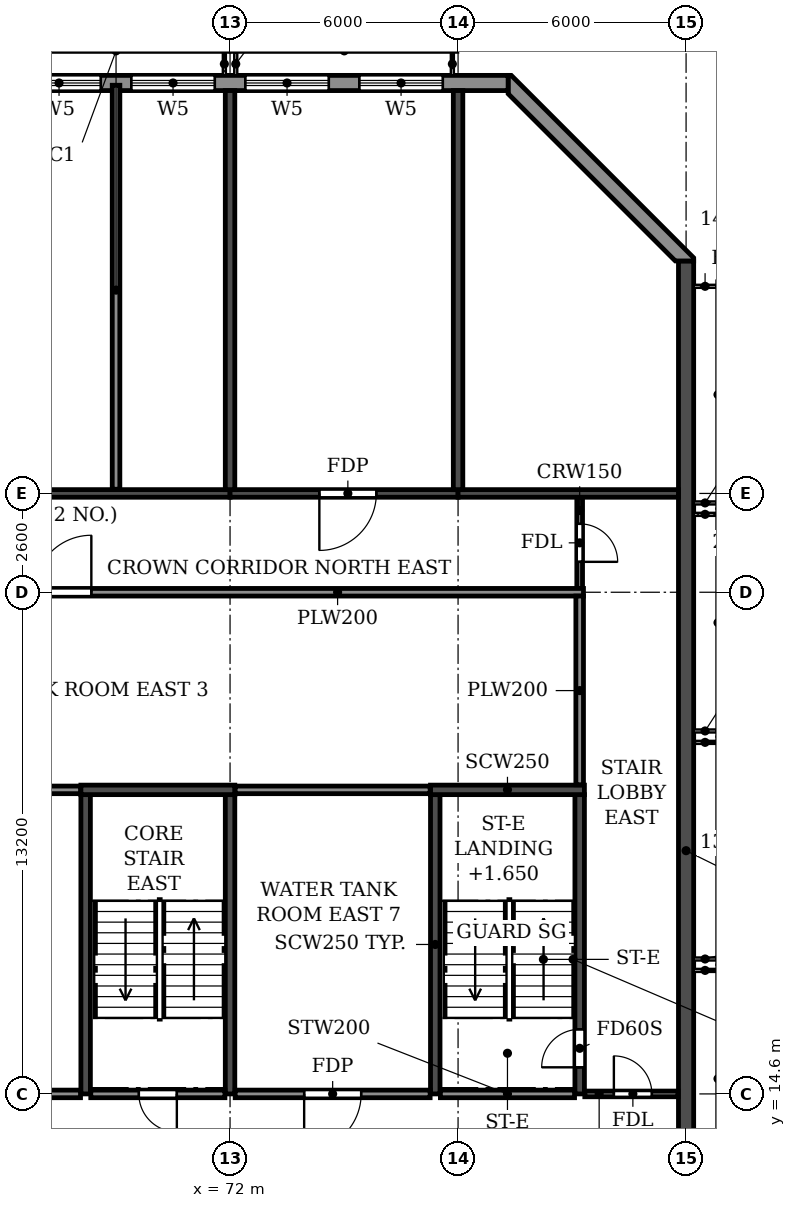
"""IFC4 building model, lengths in metres.
Left out: names, types, materials, properties, quantities, classifications, styles, units other than length and angle.
Written with IfcOpenShell. Run it as: python <this file> out.ifc"""

import sys

from ifc_helpers import new_model, si_unit, direction, frame, frame_2d, origin, place, context, subcontext, project, spatial, polyline, rectangle, outline, extrude, element, fill, save


model = new_model("IFC4")
c1 = context("Model", 3, precision=1e-05, world=origin(), true_north=direction((0.0, 1.0)))
c2 = subcontext(c1, "Body", "Model", "MODEL_VIEW")
j1 = project(units=[si_unit("LENGTHUNIT", "METRE"), si_unit("PLANEANGLEUNIT", "RADIAN")], contexts=[c1])
p1 = place(None, origin())
s1 = spatial("IfcSite", under=j1, at=p1, CompositionType="ELEMENT")
p2 = place(p1, origin())
s2 = spatial("IfcBuilding", under=s1, at=p2, CompositionType="ELEMENT")
p3 = place(p2, frame((0.0, 0.0, 272.4)))
s3 = spatial("IfcBuildingStorey", under=s2, at=p3, CompositionType="ELEMENT", Elevation=272.4)
for number, where, z_axis, x_axis in (
    (1, (72.0, 30.5, 0.0), (0.0, 0.0, 1.0), (0.0, 1.0, 0.0)),
    (2, (78.0, 30.5, 0.0), (0.0, 0.0, 1.0), (0.0, 1.0, 0.0)),
):
    element("IfcWall", number, at=place(p3, frame(where, z_axis=z_axis, x_axis=x_axis)), inside=s3, PredefinedType="SHEAR", context=c2, shape_type="SweptSolid", body=[
        extrude(rectangle(XDim=10.5, YDim=0.25, at=frame_2d((5.25, 0.0))), origin(), (0.0, 0.0, 1.0), 3.05),
    ])
p4 = place(p3, frame((84.0, 4.683, 0.0), z_axis=(0.0, 0.0, 1.0), x_axis=(0.0, 1.0, 0.0)))
e3 = element("IfcWall", 3, at=p4, inside=s3, PredefinedType="SHEAR", context=c2, shape_type="SweptSolid", body=[
    extrude(rectangle(XDim=31.834, YDim=0.4, at=frame_2d((15.917, 0.0))), origin(), (0.0, 0.0, 1.0), 3.05),
])
p5 = place(p3, frame((66.0, 30.4, 0.0), z_axis=(0.0, 0.0, 1.0), x_axis=(1.0, 0.0, 0.0)))
e4 = element("IfcWall", 4, at=p5, inside=s3, PredefinedType="SHEAR", context=c2, shape_type="SweptSolid", body=[
    extrude(rectangle(XDim=6.0, YDim=0.2, at=frame_2d((3.0, 0.0))), origin(), (0.0, 0.0, 1.0), 2.45),
])
p6 = place(p3, frame((72.0, 30.4, 0.0), z_axis=(0.0, 0.0, 1.0), x_axis=(1.0, 0.0, 0.0)))
e5 = element("IfcWall", 5, at=p6, inside=s3, PredefinedType="SHEAR", context=c2, shape_type="SweptSolid", body=[
    extrude(rectangle(XDim=6.0, YDim=0.2, at=frame_2d((3.0, 0.0))), origin(), (0.0, 0.0, 1.0), 2.45),
])
p7 = place(p6, frame((2.35, 0.0, 0.0)))
e6 = element("IfcOpeningElement", 6, at=p7, cuts=e5, PredefinedType="OPENING", context=c2, shape_type="SweptSolid", body=[
    extrude(rectangle(XDim=1.5, YDim=2.1, at=frame_2d((0.75, 1.05))), frame((0.0, 0.11, 0.0), z_axis=(0.0, -1.0, 0.0), x_axis=(1.0, 0.0, 0.0)), (0.0, 0.0, 1.0), 0.22),
])
p8 = place(p3, frame((78.0, 30.4, 0.0), z_axis=(0.0, 0.0, 1.0), x_axis=(1.0, 0.0, 0.0)))
e7 = element("IfcWall", 7, at=p8, inside=s3, PredefinedType="SHEAR", context=c2, shape_type="SweptSolid", body=[
    extrude(rectangle(XDim=5.8, YDim=0.2, at=frame_2d((2.9, 0.0))), origin(), (0.0, 0.0, 1.0), 2.45),
])
p9 = place(p3, frame((77.4, 14.6, 0.0), z_axis=(0.0, 0.0, 1.0), x_axis=(0.0, 1.0, 0.0)))
e8 = element("IfcWall", 8, at=p9, inside=s3, PredefinedType="SOLIDWALL", context=c2, shape_type="SweptSolid", body=[
    extrude(rectangle(XDim=7.875, YDim=0.25, at=frame_2d((3.938, 0.0))), origin(), (0.0, 0.0, 1.0), 3.05),
])
p10 = place(p3, frame((81.2, 14.6, 0.0), z_axis=(0.0, 0.0, 1.0), x_axis=(0.0, 1.0, 0.0)))
e9 = element("IfcWall", 9, at=p10, inside=s3, PredefinedType="SOLIDWALL", context=c2, shape_type="SweptSolid", body=[
    extrude(rectangle(XDim=7.875, YDim=0.25, at=frame_2d((3.938, 0.0))), origin(), (0.0, 0.0, 1.0), 3.05),
])
p11 = place(p10, frame((0.7, 0.0, 0.0)))
e10 = element("IfcOpeningElement", 10, at=p11, cuts=e9, PredefinedType="OPENING", context=c2, shape_type="SweptSolid", body=[
    extrude(rectangle(XDim=1.0, YDim=2.1, at=frame_2d((0.5, 1.05))), frame((0.0, 0.135, 0.0), z_axis=(0.0, -1.0, 0.0), x_axis=(1.0, 0.0, 0.0)), (0.0, 0.0, 1.0), 0.27),
])
p12 = place(p3, frame((77.275, 22.6, 0.0), z_axis=(0.0, 0.0, 1.0), x_axis=(1.0, 0.0, 0.0)))
e11 = element("IfcWall", 11, at=p12, inside=s3, PredefinedType="SOLIDWALL", context=c2, shape_type="SweptSolid", body=[
    extrude(rectangle(XDim=4.05, YDim=0.25, at=frame_2d((2.025, 0.0))), origin(), (0.0, 0.0, 1.0), 3.05),
])
for number, where, z_axis, x_axis in (
    (12, (68.2, 14.6, 0.0), (0.0, 0.0, 1.0), (0.0, 1.0, 0.0)),
    (13, (72.0, 14.6, 0.0), (0.0, 0.0, 1.0), (0.0, 1.0, 0.0)),
):
    element("IfcWall", number, at=place(p3, frame(where, z_axis=z_axis, x_axis=x_axis)), inside=s3, PredefinedType="SOLIDWALL", context=c2, shape_type="SweptSolid", body=[
        extrude(rectangle(XDim=7.875, YDim=0.25, at=frame_2d((3.938, 0.0))), origin(), (0.0, 0.0, 1.0), 3.05),
    ])
p13 = place(p3, frame((68.075, 22.6, 0.0), z_axis=(0.0, 0.0, 1.0), x_axis=(1.0, 0.0, 0.0)))
e14 = element("IfcWall", 14, at=p13, inside=s3, PredefinedType="SOLIDWALL", context=c2, shape_type="SweptSolid", body=[
    extrude(rectangle(XDim=4.05, YDim=0.25, at=frame_2d((2.025, 0.0))), origin(), (0.0, 0.0, 1.0), 3.05),
])
p14 = place(p3, origin())
e15 = element("IfcWall", 15, at=p14, inside=s3, PredefinedType="STANDARD", context=c2, shape_type="SweptSolid", body=[
    extrude(outline(polyline([(84.2, 36.517), (84.2, 36.6), (79.4, 41.4), (79.317, 41.4), (79.317, 40.917), (83.717, 36.517), (84.2, 36.517)])), origin(), (0.0, 0.0, 1.0), 3.05),
])
p15 = place(p3, frame((79.317, 41.2, 0.0), z_axis=(0.0, 0.0, 1.0), x_axis=(-1.0, 0.0, 0.0)))
e16 = element("IfcWall", 16, at=p15, inside=s3, PredefinedType="STANDARD", context=c2, shape_type="SweptSolid", body=[
    extrude(rectangle(XDim=25.517, YDim=0.4, at=frame_2d((12.759, 0.0))), origin(), (0.0, 0.0, 1.0), 3.05),
])
p16 = place(p15, frame((22.717, 0.0, 0.6)))
e17 = element("IfcOpeningElement", 17, at=p16, cuts=e16, PredefinedType="OPENING", context=c2, shape_type="SweptSolid", body=[
    extrude(rectangle(XDim=2.2, YDim=2.4, at=frame_2d((1.1, 1.2))), frame((0.0, 0.21, 0.0), z_axis=(0.0, -1.0, 0.0), x_axis=(1.0, 0.0, 0.0)), (0.0, 0.0, 1.0), 0.42),
])
p17 = place(p15, frame((19.717, 0.0, 0.6)))
e18 = element("IfcOpeningElement", 18, at=p17, cuts=e16, PredefinedType="OPENING", context=c2, shape_type="SweptSolid", body=[
    extrude(rectangle(XDim=2.2, YDim=2.4, at=frame_2d((1.1, 1.2))), frame((0.0, 0.21, 0.0), z_axis=(0.0, -1.0, 0.0), x_axis=(1.0, 0.0, 0.0)), (0.0, 0.0, 1.0), 0.42),
])
p18 = place(p15, frame((16.717, 0.0, 0.6)))
e19 = element("IfcOpeningElement", 19, at=p18, cuts=e16, PredefinedType="OPENING", context=c2, shape_type="SweptSolid", body=[
    extrude(rectangle(XDim=2.2, YDim=2.4, at=frame_2d((1.1, 1.2))), frame((0.0, 0.21, 0.0), z_axis=(0.0, -1.0, 0.0), x_axis=(1.0, 0.0, 0.0)), (0.0, 0.0, 1.0), 0.42),
])
p19 = place(p15, frame((13.717, 0.0, 0.6)))
e20 = element("IfcOpeningElement", 20, at=p19, cuts=e16, PredefinedType="OPENING", context=c2, shape_type="SweptSolid", body=[
    extrude(rectangle(XDim=2.2, YDim=2.4, at=frame_2d((1.1, 1.2))), frame((0.0, 0.21, 0.0), z_axis=(0.0, -1.0, 0.0), x_axis=(1.0, 0.0, 0.0)), (0.0, 0.0, 1.0), 0.42),
])
p20 = place(p15, frame((10.717, 0.0, 0.6)))
e21 = element("IfcOpeningElement", 21, at=p20, cuts=e16, PredefinedType="OPENING", context=c2, shape_type="SweptSolid", body=[
    extrude(rectangle(XDim=2.2, YDim=2.4, at=frame_2d((1.1, 1.2))), frame((0.0, 0.21, 0.0), z_axis=(0.0, -1.0, 0.0), x_axis=(1.0, 0.0, 0.0)), (0.0, 0.0, 1.0), 0.42),
])
p21 = place(p15, frame((7.717, 0.0, 0.6)))
e22 = element("IfcOpeningElement", 22, at=p21, cuts=e16, PredefinedType="OPENING", context=c2, shape_type="SweptSolid", body=[
    extrude(rectangle(XDim=2.2, YDim=2.4, at=frame_2d((1.1, 1.2))), frame((0.0, 0.21, 0.0), z_axis=(0.0, -1.0, 0.0), x_axis=(1.0, 0.0, 0.0)), (0.0, 0.0, 1.0), 0.42),
])
p22 = place(p15, frame((4.717, 0.0, 0.6)))
e23 = element("IfcOpeningElement", 23, at=p22, cuts=e16, PredefinedType="OPENING", context=c2, shape_type="SweptSolid", body=[
    extrude(rectangle(XDim=2.2, YDim=2.4, at=frame_2d((1.1, 1.2))), frame((0.0, 0.21, 0.0), z_axis=(0.0, -1.0, 0.0), x_axis=(1.0, 0.0, 0.0)), (0.0, 0.0, 1.0), 0.42),
])
p23 = place(p15, frame((1.717, 0.0, 0.6)))
e24 = element("IfcOpeningElement", 24, at=p23, cuts=e16, PredefinedType="OPENING", context=c2, shape_type="SweptSolid", body=[
    extrude(rectangle(XDim=2.2, YDim=2.4, at=frame_2d((1.1, 1.2))), frame((0.0, 0.21, 0.0), z_axis=(0.0, -1.0, 0.0), x_axis=(1.0, 0.0, 0.0)), (0.0, 0.0, 1.0), 0.42),
])
p24 = place(p3, frame((81.335, 14.6, 0.0), z_axis=(0.0, 0.0, 1.0), x_axis=(1.0, 0.0, 0.0)))
e25 = element("IfcWall", 25, at=p24, inside=s3, PredefinedType="PARTITIONING", context=c2, shape_type="SweptSolid", body=[
    extrude(rectangle(XDim=2.455, YDim=0.15, at=frame_2d((1.228, 0.0))), origin(), (0.0, 0.0, 1.0), 3.05),
])
p25 = place(p24, frame((0.765, 0.0, 0.0)))
e26 = element("IfcOpeningElement", 26, at=p25, cuts=e25, PredefinedType="OPENING", context=c2, shape_type="SweptSolid", body=[
    extrude(rectangle(XDim=1.0, YDim=2.1, at=frame_2d((0.5, 1.05))), frame((0.0, 0.085, 0.0), z_axis=(0.0, -1.0, 0.0), x_axis=(1.0, 0.0, 0.0)), (0.0, 0.0, 1.0), 0.17),
])
p26 = place(p3, frame((81.2, 27.9, 0.0), z_axis=(0.0, 0.0, 1.0), x_axis=(0.0, 1.0, 0.0)))
e27 = element("IfcWall", 27, at=p26, inside=s3, PredefinedType="PARTITIONING", context=c2, shape_type="SweptSolid", body=[
    extrude(rectangle(XDim=2.39, YDim=0.15, at=frame_2d((1.195, 0.0))), origin(), (0.0, 0.0, 1.0), 3.05),
])
p27 = place(p26, frame((0.7, 0.0, 0.0)))
e28 = element("IfcOpeningElement", 28, at=p27, cuts=e27, PredefinedType="OPENING", context=c2, shape_type="SweptSolid", body=[
    extrude(rectangle(XDim=1.0, YDim=2.1, at=frame_2d((0.5, 1.05))), frame((0.0, 0.085, 0.0), z_axis=(0.0, -1.0, 0.0), x_axis=(1.0, 0.0, 0.0)), (0.0, 0.0, 1.0), 0.17),
])
p28 = place(p3, frame((63.0, 14.6, 0.0), z_axis=(0.0, 0.0, 1.0), x_axis=(1.0, 0.0, 0.0)))
e29 = element("IfcWall", 29, at=p28, inside=s3, PredefinedType="PARTITIONING", context=c2, shape_type="SweptSolid", body=[
    extrude(rectangle(XDim=5.065, YDim=0.2, at=frame_2d((2.532, 0.0))), origin(), (0.0, 0.0, 1.0), 3.05),
])
p29 = place(p3, frame((72.135, 14.6, 0.0), z_axis=(0.0, 0.0, 1.0), x_axis=(1.0, 0.0, 0.0)))
e30 = element("IfcWall", 30, at=p29, inside=s3, PredefinedType="PARTITIONING", context=c2, shape_type="SweptSolid", body=[
    extrude(rectangle(XDim=5.13, YDim=0.2, at=frame_2d((2.565, 0.0))), origin(), (0.0, 0.0, 1.0), 3.05),
])
p30 = place(p29, frame((1.815, 0.0, 0.0)))
e31 = element("IfcOpeningElement", 31, at=p30, cuts=e30, PredefinedType="OPENING", context=c2, shape_type="SweptSolid", body=[
    extrude(rectangle(XDim=1.5, YDim=2.1, at=frame_2d((0.75, 1.05))), frame((0.0, 0.11, 0.0), z_axis=(0.0, -1.0, 0.0), x_axis=(1.0, 0.0, 0.0)), (0.0, 0.0, 1.0), 0.22),
])
p31 = place(p3, frame((54.21, 22.6, 0.0), z_axis=(0.0, 0.0, 1.0), x_axis=(1.0, 0.0, 0.0)))
e32 = element("IfcWall", 32, at=p31, inside=s3, PredefinedType="PARTITIONING", context=c2, shape_type="SweptSolid", body=[
    extrude(rectangle(XDim=13.855, YDim=0.2, at=frame_2d((6.927, 0.0))), origin(), (0.0, 0.0, 1.0), 3.05),
])
p32 = place(p3, frame((72.135, 22.6, 0.0), z_axis=(0.0, 0.0, 1.0), x_axis=(1.0, 0.0, 0.0)))
e33 = element("IfcWall", 33, at=p32, inside=s3, PredefinedType="PARTITIONING", context=c2, shape_type="SweptSolid", body=[
    extrude(rectangle(XDim=5.13, YDim=0.2, at=frame_2d((2.565, 0.0))), origin(), (0.0, 0.0, 1.0), 3.05),
])
p33 = place(p3, frame((54.21, 27.8, 0.0), z_axis=(0.0, 0.0, 1.0), x_axis=(1.0, 0.0, 0.0)))
e34 = element("IfcWall", 34, at=p33, inside=s3, PredefinedType="PARTITIONING", context=c2, shape_type="SweptSolid", body=[
    extrude(rectangle(XDim=27.09, YDim=0.2, at=frame_2d((13.545, 0.0))), origin(), (0.0, 0.0, 1.0), 3.05),
])
p34 = place(p33, frame((12.64, 0.0, 0.0)))
e35 = element("IfcOpeningElement", 35, at=p34, cuts=e34, PredefinedType="OPENING", context=c2, shape_type="SweptSolid", body=[
    extrude(rectangle(XDim=1.5, YDim=2.1, at=frame_2d((0.75, 1.05))), frame((0.0, 0.11, 0.0), z_axis=(0.0, -1.0, 0.0), x_axis=(1.0, 0.0, 0.0)), (0.0, 0.0, 1.0), 0.22),
])
p35 = place(p3, frame((69.0, 30.51, 0.0), z_axis=(0.0, 0.0, 1.0), x_axis=(0.0, 1.0, 0.0)))
e36 = element("IfcWall", 36, at=p35, inside=s3, PredefinedType="PARTITIONING", context=c2, shape_type="SweptSolid", body=[
    extrude(rectangle(XDim=10.63, YDim=0.2, at=frame_2d((5.315, 0.0))), origin(), (0.0, 0.0, 1.0), 3.05),
])
p36 = place(p3, frame((81.2, 22.735, 0.0), z_axis=(0.0, 0.0, 1.0), x_axis=(0.0, 1.0, 0.0)))
e37 = element("IfcWall", 37, at=p36, inside=s3, PredefinedType="PARTITIONING", context=c2, shape_type="SweptSolid", body=[
    extrude(rectangle(XDim=4.965, YDim=0.2, at=frame_2d((2.482, 0.0))), origin(), (0.0, 0.0, 1.0), 3.05),
])
p37 = place(p3, frame((68.335, 14.6, 0.0), z_axis=(0.0, 0.0, 1.0), x_axis=(1.0, 0.0, 0.0)))
e38 = element("IfcWall", 38, at=p37, inside=s3, PredefinedType="PARTITIONING", context=c2, shape_type="SweptSolid", body=[
    extrude(rectangle(XDim=3.53, YDim=0.2, at=frame_2d((1.765, 0.0))), origin(), (0.0, 0.0, 1.0), 3.05),
])
p38 = place(p37, frame((1.265, 0.0, 0.0)))
e39 = element("IfcOpeningElement", 39, at=p38, cuts=e38, PredefinedType="OPENING", context=c2, shape_type="SweptSolid", body=[
    extrude(rectangle(XDim=1.0, YDim=2.1, at=frame_2d((0.5, 1.05))), frame((0.0, 0.11, 0.0), z_axis=(0.0, -1.0, 0.0), x_axis=(1.0, 0.0, 0.0)), (0.0, 0.0, 1.0), 0.22),
])
p39 = place(p3, frame((77.535, 14.6, 0.0), z_axis=(0.0, 0.0, 1.0), x_axis=(1.0, 0.0, 0.0)))
e40 = element("IfcWall", 40, at=p39, inside=s3, PredefinedType="PARTITIONING", context=c2, shape_type="SweptSolid", body=[
    extrude(rectangle(XDim=3.53, YDim=0.2, at=frame_2d((1.765, 0.0))), origin(), (0.0, 0.0, 1.0), 3.05),
])
p40 = place(p20, origin())
e41 = element("IfcWindow", 41, at=p40, inside=s3, PartitioningType="TRIPLE_PANEL_HORIZONTAL", PredefinedType="WINDOW", context=c2, shape_type="SweptSolid", body=[
    extrude(rectangle(XDim=2.2, YDim=2.4, at=frame_2d((1.1, 1.2))), frame((0.0, 0.03, 0.0), z_axis=(0.0, -1.0, 0.0), x_axis=(1.0, 0.0, 0.0)), (0.0, 0.0, 1.0), 0.06),
])
fill(e21, e41)
p41 = place(p21, origin())
e42 = element("IfcWindow", 42, at=p41, inside=s3, PartitioningType="TRIPLE_PANEL_HORIZONTAL", PredefinedType="WINDOW", context=c2, shape_type="SweptSolid", body=[
    extrude(rectangle(XDim=2.2, YDim=2.4, at=frame_2d((1.1, 1.2))), frame((0.0, 0.03, 0.0), z_axis=(0.0, -1.0, 0.0), x_axis=(1.0, 0.0, 0.0)), (0.0, 0.0, 1.0), 0.06),
])
fill(e22, e42)
p42 = place(p22, origin())
e43 = element("IfcWindow", 43, at=p42, inside=s3, PartitioningType="TRIPLE_PANEL_HORIZONTAL", PredefinedType="WINDOW", context=c2, shape_type="SweptSolid", body=[
    extrude(rectangle(XDim=2.2, YDim=2.4, at=frame_2d((1.1, 1.2))), frame((0.0, 0.03, 0.0), z_axis=(0.0, -1.0, 0.0), x_axis=(1.0, 0.0, 0.0)), (0.0, 0.0, 1.0), 0.06),
])
fill(e23, e43)
p43 = place(p23, origin())
e44 = element("IfcWindow", 44, at=p43, inside=s3, PartitioningType="TRIPLE_PANEL_HORIZONTAL", PredefinedType="WINDOW", context=c2, shape_type="SweptSolid", body=[
    extrude(rectangle(XDim=2.2, YDim=2.4, at=frame_2d((1.1, 1.2))), frame((0.0, 0.03, 0.0), z_axis=(0.0, -1.0, 0.0), x_axis=(1.0, 0.0, 0.0)), (0.0, 0.0, 1.0), 0.06),
])
fill(e24, e44)
p44 = place(p34, origin())
e45 = element("IfcDoor", 45, at=p44, inside=s3, OperationType="DOUBLE_DOOR_SINGLE_SWING", PredefinedType="DOOR", context=c2, shape_type="SweptSolid", body=[
    extrude(rectangle(XDim=1.5, YDim=2.1, at=frame_2d((0.75, 1.05))), frame((0.0, 0.025, 0.0), z_axis=(0.0, -1.0, 0.0), x_axis=(1.0, 0.0, 0.0)), (0.0, 0.0, 1.0), 0.05),
])
fill(e35, e45)
p45 = place(p7, frame((1.5, 0.0, 0.0), z_axis=(0.0, 0.0, 1.0), x_axis=(-1.0, 0.0, 0.0)))
e46 = element("IfcDoor", 46, at=p45, inside=s3, OperationType="DOUBLE_DOOR_SINGLE_SWING", PredefinedType="DOOR", context=c2, shape_type="SweptSolid", body=[
    extrude(rectangle(XDim=1.5, YDim=2.1, at=frame_2d((0.75, 1.05))), frame((0.0, 0.025, 0.0), z_axis=(0.0, -1.0, 0.0), x_axis=(1.0, 0.0, 0.0)), (0.0, 0.0, 1.0), 0.05),
])
fill(e6, e46)
p46 = place(p30, frame((1.5, 0.0, 0.0), z_axis=(0.0, 0.0, 1.0), x_axis=(-1.0, 0.0, 0.0)))
e47 = element("IfcDoor", 47, at=p46, inside=s3, OperationType="DOUBLE_DOOR_SINGLE_SWING", PredefinedType="DOOR", context=c2, shape_type="SweptSolid", body=[
    extrude(rectangle(XDim=1.5, YDim=2.1, at=frame_2d((0.75, 1.05))), frame((0.0, 0.025, 0.0), z_axis=(0.0, -1.0, 0.0), x_axis=(1.0, 0.0, 0.0)), (0.0, 0.0, 1.0), 0.05),
])
fill(e31, e47)
p47 = place(p11, origin())
e48 = element("IfcDoor", 48, at=p47, inside=s3, OperationType="SINGLE_SWING_LEFT", PredefinedType="DOOR", context=c2, shape_type="SweptSolid", body=[
    extrude(rectangle(XDim=1.0, YDim=2.1, at=frame_2d((0.5, 1.05))), frame((0.0, 0.025, 0.0), z_axis=(0.0, -1.0, 0.0), x_axis=(1.0, 0.0, 0.0)), (0.0, 0.0, 1.0), 0.05),
])
fill(e10, e48)
p48 = place(p27, frame((1.0, 0.0, 0.0), z_axis=(0.0, 0.0, 1.0), x_axis=(-1.0, 0.0, 0.0)))
e49 = element("IfcDoor", 49, at=p48, inside=s3, OperationType="SINGLE_SWING_RIGHT", PredefinedType="DOOR", context=c2, shape_type="SweptSolid", body=[
    extrude(rectangle(XDim=1.0, YDim=2.1, at=frame_2d((0.5, 1.05))), frame((0.0, 0.025, 0.0), z_axis=(0.0, -1.0, 0.0), x_axis=(1.0, 0.0, 0.0)), (0.0, 0.0, 1.0), 0.05),
])
fill(e28, e49)
p49 = place(p25, origin())
e50 = element("IfcDoor", 50, at=p49, inside=s3, OperationType="SINGLE_SWING_LEFT", PredefinedType="DOOR", context=c2, shape_type="SweptSolid", body=[
    extrude(rectangle(XDim=1.0, YDim=2.1, at=frame_2d((0.5, 1.05))), frame((0.0, 0.025, 0.0), z_axis=(0.0, -1.0, 0.0), x_axis=(1.0, 0.0, 0.0)), (0.0, 0.0, 1.0), 0.05),
])
fill(e26, e50)
p50 = place(p38, frame((1.0, 0.0, 0.0), z_axis=(0.0, 0.0, 1.0), x_axis=(-1.0, 0.0, 0.0)))
e51 = element("IfcDoor", 51, at=p50, inside=s3, OperationType="SINGLE_SWING_LEFT", PredefinedType="DOOR", context=c2, shape_type="SweptSolid", body=[
    extrude(rectangle(XDim=1.0, YDim=2.1, at=frame_2d((0.5, 1.05))), frame((0.0, 0.025, 0.0), z_axis=(0.0, -1.0, 0.0), x_axis=(1.0, 0.0, 0.0)), (0.0, 0.0, 1.0), 0.05),
])
fill(e39, e51)
save(model, sys.argv[1])
